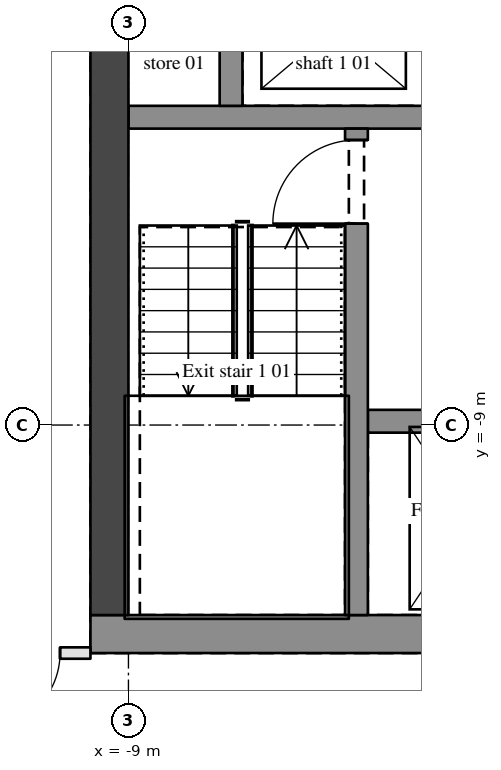
"""IFC4 building model, lengths in metres.
Left out: names, types, materials, properties, quantities, classifications, styles, units other than length and angle.
Written with IfcOpenShell. Run it as: python <this file> out.ifc"""

import sys

from ifc_helpers import new_model, si_unit, direction, frame, frame_2d, origin, place, context, subcontext, project, spatial, rectangle, extrude, element, fill, save


model = new_model("IFC4")
c1 = context("Model", 3, precision=1e-05, world=origin(), true_north=direction((0.0, 1.0)))
c2 = subcontext(c1, "Body", "Model", "MODEL_VIEW")
j1 = project(units=[si_unit("LENGTHUNIT", "METRE"), si_unit("PLANEANGLEUNIT", "RADIAN")], contexts=[c1])
p1 = place(None, origin())
s1 = spatial("IfcSite", under=j1, at=p1, CompositionType="ELEMENT")
p2 = place(p1, origin())
s2 = spatial("IfcBuilding", under=s1, at=p2, CompositionType="ELEMENT")
p3 = place(p2, frame((0.0, 0.0, 206.85)))
s3 = spatial("IfcBuildingStorey", under=s2, at=p3, CompositionType="ELEMENT", Elevation=206.85)
p4 = place(p3, frame((-9.5, -11.75, 0.0), z_axis=(0.0, 0.0, 1.0), x_axis=(1.0, 0.0, 0.0)))
e1 = element("IfcWall", 1, at=p4, inside=s3, PredefinedType="SHEAR", context=c2, shape_type="SweptSolid", body=[
    extrude(rectangle(XDim=19.0, YDim=0.5, at=frame_2d((9.5, 0.0))), origin(), (0.0, 0.0, 1.0), 3.15),
])
p5 = place(p3, frame((-9.25, -11.5, 0.0), z_axis=(0.0, 0.0, 1.0), x_axis=(0.0, 1.0, 0.0)))
e2 = element("IfcWall", 2, at=p5, inside=s3, PredefinedType="SHEAR", context=c2, shape_type="SweptSolid", body=[
    extrude(rectangle(XDim=11.65, YDim=0.5, at=frame_2d((5.825, 0.0))), origin(), (0.0, 0.0, 1.0), 3.15),
])
p6 = place(p5, frame((9.4, 0.0, 0.0)))
e3 = element("IfcOpeningElement", 3, at=p6, cuts=e2, PredefinedType="OPENING", context=c2, shape_type="SweptSolid", body=[
    extrude(rectangle(XDim=1.8, YDim=2.1, at=frame_2d((0.9, 1.05))), frame((0.0, 0.26, 0.0), z_axis=(0.0, -1.0, 0.0), x_axis=(1.0, 0.0, 0.0)), (0.0, 0.0, 1.0), 0.52),
])
p7 = place(p3, frame((-9.5, -12.0, 0.0), z_axis=(0.0, 0.0, 1.0), x_axis=(-1.0, 0.0, 0.0)))
e4 = element("IfcWall", 4, at=p7, inside=s3, PredefinedType="PARTITIONING", context=c2, shape_type="SweptSolid", body=[
    extrude(rectangle(XDim=1.875, YDim=0.15, at=frame_2d((0.938, 0.0))), origin(), (0.0, 0.0, 1.0), 2.21),
])
p8 = place(p7, frame((0.4, 0.0, 0.0)))
e5 = element("IfcOpeningElement", 5, at=p8, cuts=e4, PredefinedType="OPENING", context=c2, shape_type="SweptSolid", body=[
    extrude(rectangle(XDim=1.0, YDim=2.1, at=frame_2d((0.5, 1.05))), frame((0.0, 0.085, 0.0), z_axis=(0.0, -1.0, 0.0), x_axis=(1.0, 0.0, 0.0)), (0.0, 0.0, 1.0), 0.17),
])
p9 = place(p3, frame((-5.85, -8.95, 0.0), z_axis=(0.0, 0.0, 1.0), x_axis=(1.0, 0.0, 0.0)))
e6 = element("IfcWall", 6, at=p9, inside=s3, PredefinedType="SHEAR", context=c2, shape_type="SweptSolid", body=[
    extrude(rectangle(XDim=11.7, YDim=0.3, at=frame_2d((5.85, 0.0))), origin(), (0.0, 0.0, 1.0), 3.15),
])
p10 = place(p9, frame((0.8, 0.0, 0.0)))
e7 = element("IfcOpeningElement", 7, at=p10, cuts=e6, PredefinedType="OPENING", context=c2, shape_type="SweptSolid", body=[
    extrude(rectangle(XDim=1.1, YDim=2.1, at=frame_2d((0.55, 1.05))), frame((0.0, 0.16, 0.0), z_axis=(0.0, -1.0, 0.0), x_axis=(1.0, 0.0, 0.0)), (0.0, 0.0, 1.0), 0.32),
])
p11 = place(p9, frame((3.8, 0.0, 0.0)))
e8 = element("IfcOpeningElement", 8, at=p11, cuts=e6, PredefinedType="OPENING", context=c2, shape_type="SweptSolid", body=[
    extrude(rectangle(XDim=1.1, YDim=2.1, at=frame_2d((0.55, 1.05))), frame((0.0, 0.16, 0.0), z_axis=(0.0, -1.0, 0.0), x_axis=(1.0, 0.0, 0.0)), (0.0, 0.0, 1.0), 0.32),
])
p12 = place(p9, frame((6.8, 0.0, 0.0)))
e9 = element("IfcOpeningElement", 9, at=p12, cuts=e6, PredefinedType="OPENING", context=c2, shape_type="SweptSolid", body=[
    extrude(rectangle(XDim=1.1, YDim=2.1, at=frame_2d((0.55, 1.05))), frame((0.0, 0.16, 0.0), z_axis=(0.0, -1.0, 0.0), x_axis=(1.0, 0.0, 0.0)), (0.0, 0.0, 1.0), 0.32),
])
p13 = place(p9, frame((9.8, 0.0, 0.0)))
e10 = element("IfcOpeningElement", 10, at=p13, cuts=e6, PredefinedType="OPENING", context=c2, shape_type="SweptSolid", body=[
    extrude(rectangle(XDim=1.1, YDim=2.1, at=frame_2d((0.55, 1.05))), frame((0.0, 0.16, 0.0), z_axis=(0.0, -1.0, 0.0), x_axis=(1.0, 0.0, 0.0)), (0.0, 0.0, 1.0), 0.32),
])
p14 = place(p3, frame((-9.0, -4.95, 0.0), z_axis=(0.0, 0.0, 1.0), x_axis=(1.0, 0.0, 0.0)))
e11 = element("IfcWall", 11, at=p14, inside=s3, PredefinedType="SHEAR", context=c2, shape_type="SweptSolid", body=[
    extrude(rectangle(XDim=6.75, YDim=0.3, at=frame_2d((3.375, 0.0))), origin(), (0.0, 0.0, 1.0), 3.15),
])
p15 = place(p3, frame((-7.65, -4.8, 0.0), z_axis=(0.0, 0.0, 1.0), x_axis=(0.0, 1.0, 0.0)))
e12 = element("IfcWall", 12, at=p15, inside=s3, PredefinedType="SHEAR", context=c2, shape_type="SweptSolid", body=[
    extrude(rectangle(XDim=2.05, YDim=0.3, at=frame_2d((1.025, 0.0))), origin(), (0.0, 0.0, 1.0), 3.15),
])
p16 = place(p3, frame((-6.0, -11.5, 0.0), z_axis=(0.0, 0.0, 1.0), x_axis=(0.0, 1.0, 0.0)))
e13 = element("IfcWall", 13, at=p16, inside=s3, PredefinedType="SHEAR", context=c2, shape_type="SweptSolid", body=[
    extrude(rectangle(XDim=6.4, YDim=0.3, at=frame_2d((3.2, 0.0))), origin(), (0.0, 0.0, 1.0), 3.15),
])
p17 = place(p16, frame((5.15, 0.0, 0.0)))
e14 = element("IfcOpeningElement", 14, at=p17, cuts=e13, PredefinedType="OPENING", context=c2, shape_type="SweptSolid", body=[
    extrude(rectangle(XDim=1.1, YDim=2.1, at=frame_2d((0.55, 1.05))), frame((0.0, 0.16, 0.0), z_axis=(0.0, -1.0, 0.0), x_axis=(1.0, 0.0, 0.0)), (0.0, 0.0, 1.0), 0.32),
])
p18 = place(p17, origin())
e15 = element("IfcDoor", 15, at=p18, inside=s3, OperationType="SINGLE_SWING_LEFT", PredefinedType="DOOR", context=c2, shape_type="SweptSolid", body=[
    extrude(rectangle(XDim=1.1, YDim=2.1, at=frame_2d((0.55, 1.05))), frame((0.0, 0.025, 0.0), z_axis=(0.0, -1.0, 0.0), x_axis=(1.0, 0.0, 0.0)), (0.0, 0.0, 1.0), 0.05),
])
fill(e14, e15)
p19 = place(p8, origin())
e16 = element("IfcDoor", 16, at=p19, inside=s3, OperationType="SINGLE_SWING_RIGHT", PredefinedType="DOOR", context=c2, shape_type="SweptSolid", body=[
    extrude(rectangle(XDim=1.0, YDim=2.1, at=frame_2d((0.5, 1.05))), frame((0.0, 0.025, 0.0), z_axis=(0.0, -1.0, 0.0), x_axis=(1.0, 0.0, 0.0)), (0.0, 0.0, 1.0), 0.05),
])
fill(e5, e16)
save(model, sys.argv[1])
